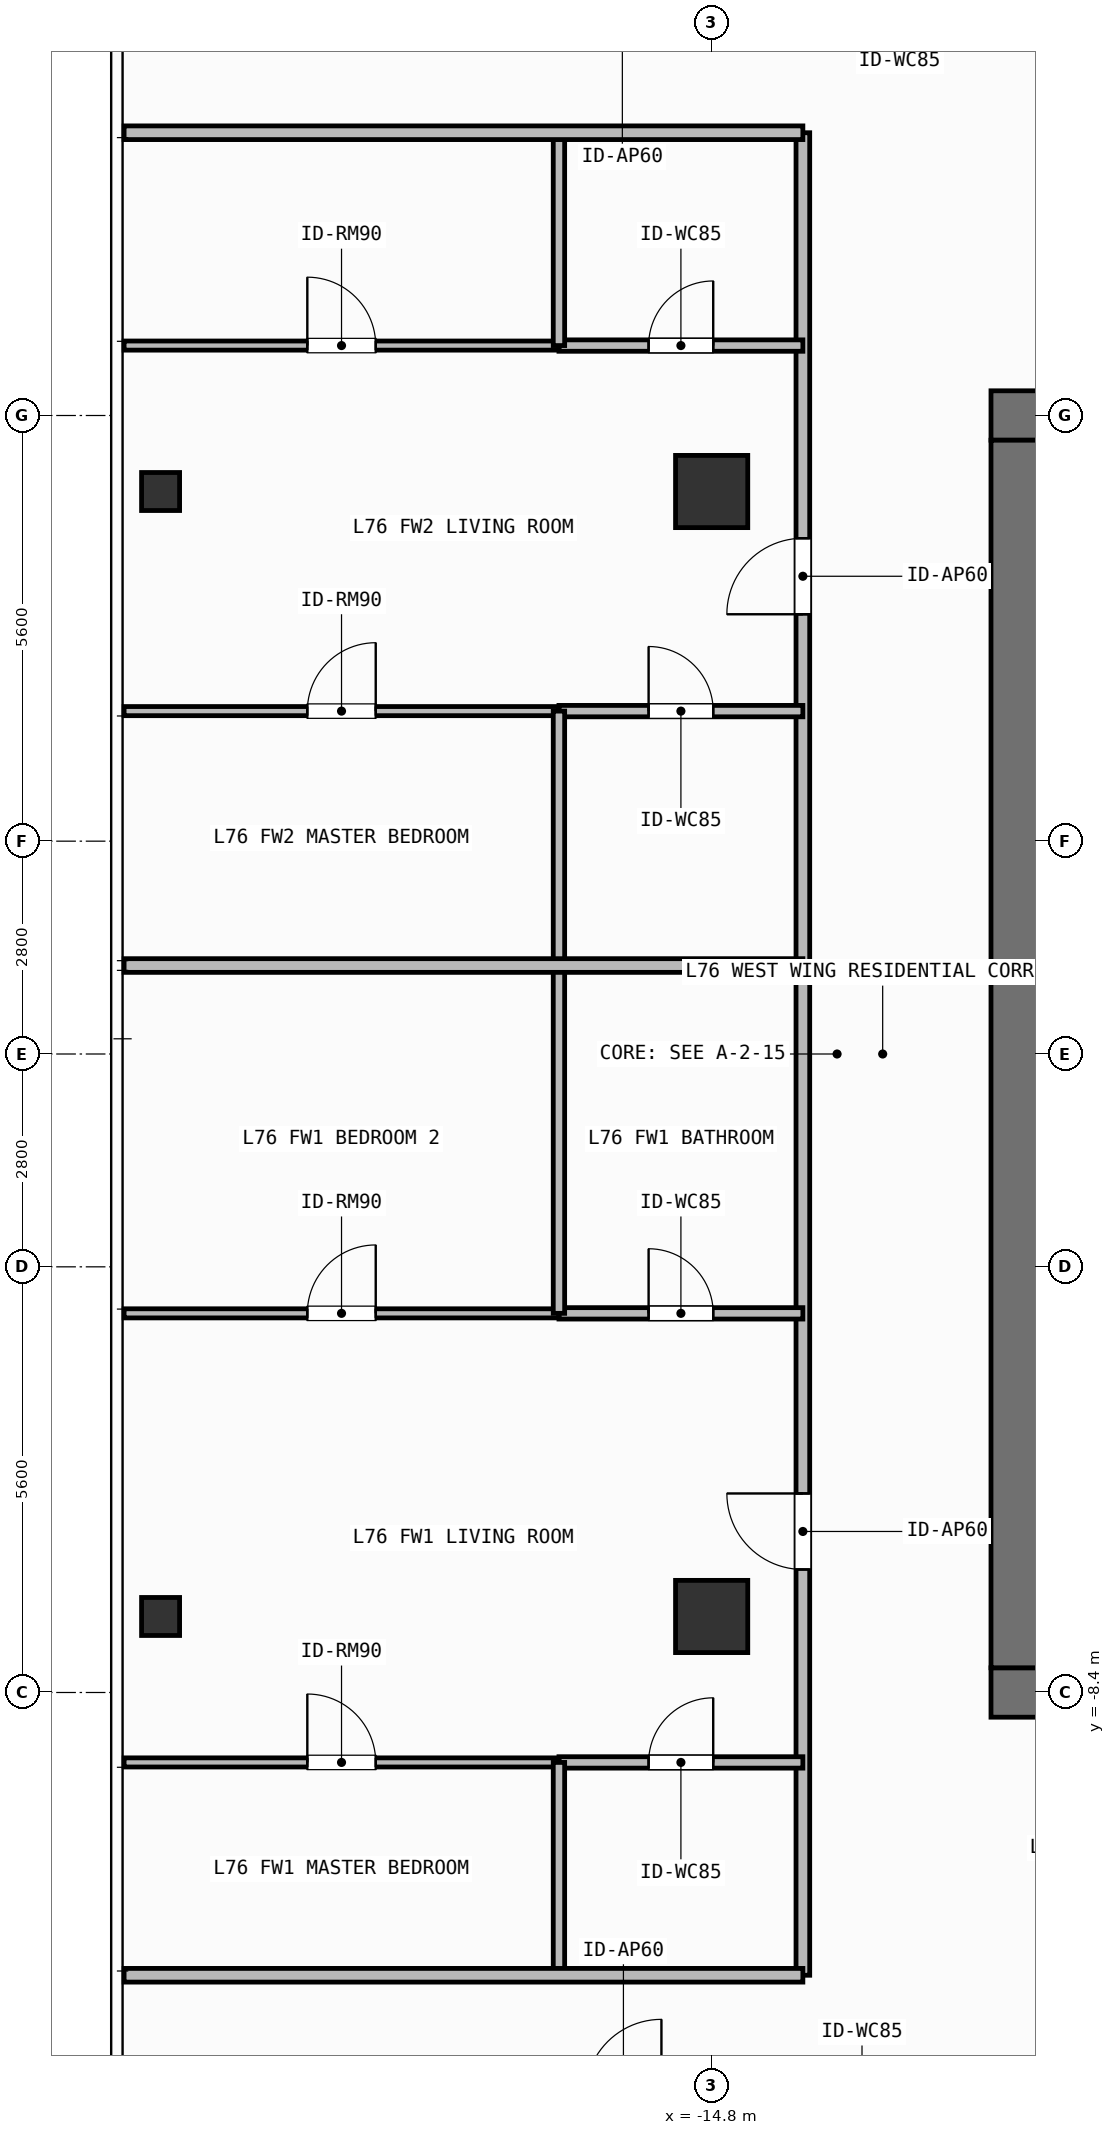
"""IFC4 building model, lengths in metres.
Left out: names, types, materials, properties, quantities, classifications, styles, units other than length and angle.
Written with IfcOpenShell. Run it as: python <this file> out.ifc"""

import sys

from ifc_helpers import new_model, si_unit, direction, frame, frame_2d, origin, origin_2d, place, context, subcontext, project, spatial, rectangle, hollow_rectangle, extrude, element, fill, save


model = new_model("IFC4")
c1 = context("Model", 3, precision=1e-05, world=origin(), true_north=direction((0.0, 1.0)))
c2 = subcontext(c1, "Body", "Model", "MODEL_VIEW")
j1 = project(units=[si_unit("LENGTHUNIT", "METRE"), si_unit("PLANEANGLEUNIT", "RADIAN")], contexts=[c1])
p1 = place(None, origin())
s1 = spatial("IfcSite", under=j1, at=p1, CompositionType="ELEMENT")
p2 = place(p1, origin())
s2 = spatial("IfcBuilding", under=s1, at=p2, CompositionType="ELEMENT")
p3 = place(p2, frame((0.0, 0.0, 309.3)))
s3 = spatial("IfcBuildingStorey", under=s2, at=p3, CompositionType="ELEMENT", Elevation=309.3)
for number, where, z_axis, x_axis in (
    (1, (-11.125, -8.4, 0.0), (0.0, 0.0, 1.0), (1.0, 0.0, 0.0)),
    (2, (-11.125, 8.4, 0.0), (0.0, 0.0, 1.0), (1.0, 0.0, 0.0)),
):
    element("IfcWall", number, at=place(p3, frame(where, z_axis=z_axis, x_axis=x_axis)), inside=s3, PredefinedType="SHEAR", context=c2, shape_type="SweptSolid", body=[
        extrude(rectangle(XDim=1.425, YDim=0.65, at=frame_2d((0.712, 0.0))), origin(), (0.0, 0.0, 1.0), 3.9),
    ])
p4 = place(p3, frame((-10.8, -8.075, 0.0), z_axis=(0.0, 0.0, 1.0), x_axis=(0.0, 1.0, 0.0)))
e3 = element("IfcWall", 3, at=p4, inside=s3, PredefinedType="SHEAR", context=c2, shape_type="SweptSolid", body=[
    extrude(rectangle(XDim=16.15, YDim=0.65, at=frame_2d((8.075, 0.0))), origin(), (0.0, 0.0, 1.0), 3.9),
])
for number, where, z_axis, x_axis in (
    (4, (-14.8, -7.4, 0.0), (0.0, 0.0, 1.0), (1.0, 0.0, 0.0)),
    (5, (-14.8, 7.4, 0.0), (0.0, 0.0, 1.0), (1.0, 0.0, 0.0)),
):
    element("IfcColumn", number, at=place(p3, frame(where, z_axis=z_axis, x_axis=x_axis)), inside=s3, PredefinedType="COLUMN", context=c2, shape_type="SweptSolid", body=[
        extrude(rectangle(XDim=0.95, YDim=0.95, at=origin_2d()), origin(), (0.0, 0.0, 1.0), 3.9),
    ])
for number, where, z_axis, x_axis in (
    (6, (-22.05, -7.4, 0.0), (0.0, 0.0, 1.0), (1.0, 0.0, 0.0)),
    (7, (-22.05, 7.4, 0.0), (0.0, 0.0, 1.0), (1.0, 0.0, 0.0)),
):
    element("IfcColumn", number, at=place(p3, frame(where, z_axis=z_axis, x_axis=x_axis)), inside=s3, PredefinedType="COLUMN", context=c2, shape_type="SweptSolid", body=[
        extrude(hollow_rectangle(XDim=0.5, YDim=0.5, WallThickness=0.025, at=origin_2d()), origin(), (0.0, 0.0, 1.0), 3.9),
    ])
p5 = place(p3, frame((-13.6, -12.12, 0.0), z_axis=(0.0, 0.0, 1.0), x_axis=(0.0, 1.0, 0.0)))
e8 = element("IfcWall", 8, at=p5, inside=s3, PredefinedType="PARTITIONING", context=c2, shape_type="SweptSolid", body=[
    extrude(rectangle(XDim=13.284, YDim=0.18, at=frame_2d((6.642, 0.0))), origin(), (0.0, 0.0, 1.0), 3.64),
])
p6 = place(p5, frame((5.338, 0.0, 0.0)))
e9 = element("IfcOpeningElement", 9, at=p6, cuts=e8, PredefinedType="OPENING", context=c2, shape_type="SweptSolid", body=[
    extrude(rectangle(XDim=1.0, YDim=2.2, at=frame_2d((0.5, 1.1))), frame((0.0, 0.1, 0.0), z_axis=(0.0, -1.0, 0.0), x_axis=(1.0, 0.0, 0.0)), (0.0, 0.0, 1.0), 0.2),
])
p7 = place(p3, frame((-16.809, -3.412, 0.0), z_axis=(0.0, 0.0, 1.0), x_axis=(1.0, 0.0, 0.0)))
e10 = element("IfcWall", 10, at=p7, inside=s3, PredefinedType="PARTITIONING", context=c2, shape_type="SweptSolid", body=[
    extrude(rectangle(XDim=3.209, YDim=0.15, at=frame_2d((1.604, 0.0))), origin(), (0.0, 0.0, 1.0), 3.64),
])
p8 = place(p7, frame((1.179, 0.0, 0.0)))
e11 = element("IfcOpeningElement", 11, at=p8, cuts=e10, PredefinedType="OPENING", context=c2, shape_type="SweptSolid", body=[
    extrude(rectangle(XDim=0.85, YDim=2.1, at=frame_2d((0.425, 1.05))), frame((0.0, 0.085, 0.0), z_axis=(0.0, -1.0, 0.0), x_axis=(1.0, 0.0, 0.0)), (0.0, 0.0, 1.0), 0.17),
])
p9 = place(p3, frame((-16.809, -9.32, 0.0), z_axis=(0.0, 0.0, 1.0), x_axis=(1.0, 0.0, 0.0)))
e12 = element("IfcWall", 12, at=p9, inside=s3, PredefinedType="PARTITIONING", context=c2, shape_type="SweptSolid", body=[
    extrude(rectangle(XDim=3.209, YDim=0.15, at=frame_2d((1.604, 0.0))), origin(), (0.0, 0.0, 1.0), 3.64),
])
p10 = place(p9, frame((1.179, 0.0, 0.0)))
e13 = element("IfcOpeningElement", 13, at=p10, cuts=e12, PredefinedType="OPENING", context=c2, shape_type="SweptSolid", body=[
    extrude(rectangle(XDim=0.85, YDim=2.1, at=frame_2d((0.425, 1.05))), frame((0.0, 0.085, 0.0), z_axis=(0.0, -1.0, 0.0), x_axis=(1.0, 0.0, 0.0)), (0.0, 0.0, 1.0), 0.17),
])
p11 = place(p3, frame((-22.53, -9.32, 0.0), z_axis=(0.0, 0.0, 1.0), x_axis=(1.0, 0.0, 0.0)))
e14 = element("IfcWall", 14, at=p11, inside=s3, PredefinedType="PARTITIONING", context=c2, shape_type="SweptSolid", body=[
    extrude(rectangle(XDim=5.721, YDim=0.12, at=frame_2d((2.86, 0.0))), origin(), (0.0, 0.0, 1.0), 3.64),
])
p12 = place(p11, frame((2.41, 0.0, 0.0)))
e15 = element("IfcOpeningElement", 15, at=p12, cuts=e14, PredefinedType="OPENING", context=c2, shape_type="SweptSolid", body=[
    extrude(rectangle(XDim=0.9, YDim=2.1, at=frame_2d((0.45, 1.05))), frame((0.0, 0.07, 0.0), z_axis=(0.0, -1.0, 0.0), x_axis=(1.0, 0.0, 0.0)), (0.0, 0.0, 1.0), 0.14),
])
p13 = place(p3, frame((-22.53, -3.412, 0.0), z_axis=(0.0, 0.0, 1.0), x_axis=(1.0, 0.0, 0.0)))
e16 = element("IfcWall", 16, at=p13, inside=s3, PredefinedType="PARTITIONING", context=c2, shape_type="SweptSolid", body=[
    extrude(rectangle(XDim=5.721, YDim=0.12, at=frame_2d((2.86, 0.0))), origin(), (0.0, 0.0, 1.0), 3.64),
])
p14 = place(p13, frame((2.41, 0.0, 0.0)))
e17 = element("IfcOpeningElement", 17, at=p14, cuts=e16, PredefinedType="OPENING", context=c2, shape_type="SweptSolid", body=[
    extrude(rectangle(XDim=0.9, YDim=2.1, at=frame_2d((0.45, 1.05))), frame((0.0, 0.07, 0.0), z_axis=(0.0, -1.0, 0.0), x_axis=(1.0, 0.0, 0.0)), (0.0, 0.0, 1.0), 0.14),
])
p15 = place(p3, frame((-13.6, 1.164, 0.0), z_axis=(0.0, 0.0, 1.0), x_axis=(0.0, 1.0, 0.0)))
e18 = element("IfcWall", 18, at=p15, inside=s3, PredefinedType="PARTITIONING", context=c2, shape_type="SweptSolid", body=[
    extrude(rectangle(XDim=10.956, YDim=0.18, at=frame_2d((5.478, 0.0))), origin(), (0.0, 0.0, 1.0), 3.64),
])
p16 = place(p15, frame((4.621, 0.0, 0.0)))
e19 = element("IfcOpeningElement", 19, at=p16, cuts=e18, PredefinedType="OPENING", context=c2, shape_type="SweptSolid", body=[
    extrude(rectangle(XDim=1.0, YDim=2.2, at=frame_2d((0.5, 1.1))), frame((0.0, 0.1, 0.0), z_axis=(0.0, -1.0, 0.0), x_axis=(1.0, 0.0, 0.0)), (0.0, 0.0, 1.0), 0.2),
])
p17 = place(p3, frame((-16.809, 9.32, 0.0), z_axis=(0.0, 0.0, 1.0), x_axis=(1.0, 0.0, 0.0)))
e20 = element("IfcWall", 20, at=p17, inside=s3, PredefinedType="PARTITIONING", context=c2, shape_type="SweptSolid", body=[
    extrude(rectangle(XDim=3.209, YDim=0.15, at=frame_2d((1.604, 0.0))), origin(), (0.0, 0.0, 1.0), 3.64),
])
p18 = place(p17, frame((1.179, 0.0, 0.0)))
e21 = element("IfcOpeningElement", 21, at=p18, cuts=e20, PredefinedType="OPENING", context=c2, shape_type="SweptSolid", body=[
    extrude(rectangle(XDim=0.85, YDim=2.1, at=frame_2d((0.425, 1.05))), frame((0.0, 0.085, 0.0), z_axis=(0.0, -1.0, 0.0), x_axis=(1.0, 0.0, 0.0)), (0.0, 0.0, 1.0), 0.17),
])
p19 = place(p3, frame((-16.809, 4.511, 0.0), z_axis=(0.0, 0.0, 1.0), x_axis=(1.0, 0.0, 0.0)))
e22 = element("IfcWall", 22, at=p19, inside=s3, PredefinedType="PARTITIONING", context=c2, shape_type="SweptSolid", body=[
    extrude(rectangle(XDim=3.209, YDim=0.15, at=frame_2d((1.604, 0.0))), origin(), (0.0, 0.0, 1.0), 3.64),
])
p20 = place(p19, frame((1.179, 0.0, 0.0)))
e23 = element("IfcOpeningElement", 23, at=p20, cuts=e22, PredefinedType="OPENING", context=c2, shape_type="SweptSolid", body=[
    extrude(rectangle(XDim=0.85, YDim=2.1, at=frame_2d((0.425, 1.05))), frame((0.0, 0.085, 0.0), z_axis=(0.0, -1.0, 0.0), x_axis=(1.0, 0.0, 0.0)), (0.0, 0.0, 1.0), 0.17),
])
p21 = place(p3, frame((-22.53, 4.511, 0.0), z_axis=(0.0, 0.0, 1.0), x_axis=(1.0, 0.0, 0.0)))
e24 = element("IfcWall", 24, at=p21, inside=s3, PredefinedType="PARTITIONING", context=c2, shape_type="SweptSolid", body=[
    extrude(rectangle(XDim=5.721, YDim=0.12, at=frame_2d((2.86, 0.0))), origin(), (0.0, 0.0, 1.0), 3.64),
])
p22 = place(p21, frame((2.41, 0.0, 0.0)))
e25 = element("IfcOpeningElement", 25, at=p22, cuts=e24, PredefinedType="OPENING", context=c2, shape_type="SweptSolid", body=[
    extrude(rectangle(XDim=0.9, YDim=2.1, at=frame_2d((0.45, 1.05))), frame((0.0, 0.07, 0.0), z_axis=(0.0, -1.0, 0.0), x_axis=(1.0, 0.0, 0.0)), (0.0, 0.0, 1.0), 0.14),
])
p23 = place(p3, frame((-22.53, 9.32, 0.0), z_axis=(0.0, 0.0, 1.0), x_axis=(1.0, 0.0, 0.0)))
e26 = element("IfcWall", 26, at=p23, inside=s3, PredefinedType="PARTITIONING", context=c2, shape_type="SweptSolid", body=[
    extrude(rectangle(XDim=5.721, YDim=0.12, at=frame_2d((2.86, 0.0))), origin(), (0.0, 0.0, 1.0), 3.64),
])
p24 = place(p23, frame((2.41, 0.0, 0.0)))
e27 = element("IfcOpeningElement", 27, at=p24, cuts=e26, PredefinedType="OPENING", context=c2, shape_type="SweptSolid", body=[
    extrude(rectangle(XDim=0.9, YDim=2.1, at=frame_2d((0.45, 1.05))), frame((0.0, 0.07, 0.0), z_axis=(0.0, -1.0, 0.0), x_axis=(1.0, 0.0, 0.0)), (0.0, 0.0, 1.0), 0.14),
])
p25 = place(p3, frame((-16.809, -12.12, 0.0), z_axis=(0.0, 0.0, 1.0), x_axis=(0.0, 1.0, 0.0)))
e28 = element("IfcWall", 28, at=p25, inside=s3, PredefinedType="PARTITIONING", context=c2, shape_type="SweptSolid", body=[
    extrude(rectangle(XDim=2.8, YDim=0.15, at=frame_2d((1.4, 0.0))), origin(), (0.0, 0.0, 1.0), 3.64),
])
p26 = place(p3, frame((-16.809, -3.412, 0.0), z_axis=(0.0, 0.0, 1.0), x_axis=(0.0, 1.0, 0.0)))
e29 = element("IfcWall", 29, at=p26, inside=s3, PredefinedType="PARTITIONING", context=c2, shape_type="SweptSolid", body=[
    extrude(rectangle(XDim=4.576, YDim=0.15, at=frame_2d((2.288, 0.0))), origin(), (0.0, 0.0, 1.0), 3.64),
])
p27 = place(p3, frame((-16.809, 1.164, 0.0), z_axis=(0.0, 0.0, 1.0), x_axis=(0.0, 1.0, 0.0)))
e30 = element("IfcWall", 30, at=p27, inside=s3, PredefinedType="PARTITIONING", context=c2, shape_type="SweptSolid", body=[
    extrude(rectangle(XDim=3.347, YDim=0.15, at=frame_2d((1.673, 0.0))), origin(), (0.0, 0.0, 1.0), 3.64),
])
p28 = place(p3, frame((-16.809, 9.32, 0.0), z_axis=(0.0, 0.0, 1.0), x_axis=(0.0, 1.0, 0.0)))
e31 = element("IfcWall", 31, at=p28, inside=s3, PredefinedType="PARTITIONING", context=c2, shape_type="SweptSolid", body=[
    extrude(rectangle(XDim=2.8, YDim=0.15, at=frame_2d((1.4, 0.0))), origin(), (0.0, 0.0, 1.0), 3.64),
])
for number, where, z_axis, x_axis in (
    (32, (-22.53, 1.164, 0.0), (0.0, 0.0, 1.0), (1.0, 0.0, 0.0)),
    (33, (-22.53, -12.12, 0.0), (0.0, 0.0, 1.0), (1.0, 0.0, 0.0)),
    (34, (-22.53, 12.12, 0.0), (0.0, 0.0, 1.0), (1.0, 0.0, 0.0)),
):
    element("IfcWall", number, at=place(p3, frame(where, z_axis=z_axis, x_axis=x_axis)), inside=s3, PredefinedType="PARTITIONING", context=c2, shape_type="SweptSolid", body=[
        extrude(rectangle(XDim=8.93, YDim=0.18, at=frame_2d((4.465, 0.0))), origin(), (0.0, 0.0, 1.0), 3.64),
    ])
p29 = place(p6, origin())
e35 = element("IfcDoor", 35, at=p29, inside=s3, OperationType="SINGLE_SWING_RIGHT", PredefinedType="DOOR", context=c2, shape_type="SweptSolid", body=[
    extrude(rectangle(XDim=1.0, YDim=2.2, at=frame_2d((0.5, 1.1))), frame((0.0, 0.025, 0.0), z_axis=(0.0, -1.0, 0.0), x_axis=(1.0, 0.0, 0.0)), (0.0, 0.0, 1.0), 0.05),
])
fill(e9, e35)
p30 = place(p8, origin())
e36 = element("IfcDoor", 36, at=p30, inside=s3, OperationType="SINGLE_SWING_LEFT", PredefinedType="DOOR", context=c2, shape_type="SweptSolid", body=[
    extrude(rectangle(XDim=0.85, YDim=2.1, at=frame_2d((0.425, 1.05))), frame((0.0, 0.025, 0.0), z_axis=(0.0, -1.0, 0.0), x_axis=(1.0, 0.0, 0.0)), (0.0, 0.0, 1.0), 0.05),
])
fill(e11, e36)
p31 = place(p10, origin())
e37 = element("IfcDoor", 37, at=p31, inside=s3, OperationType="SINGLE_SWING_RIGHT", PredefinedType="DOOR", context=c2, shape_type="SweptSolid", body=[
    extrude(rectangle(XDim=0.85, YDim=2.1, at=frame_2d((0.425, 1.05))), frame((0.0, 0.025, 0.0), z_axis=(0.0, -1.0, 0.0), x_axis=(1.0, 0.0, 0.0)), (0.0, 0.0, 1.0), 0.05),
])
fill(e13, e37)
p32 = place(p12, origin())
e38 = element("IfcDoor", 38, at=p32, inside=s3, OperationType="SINGLE_SWING_LEFT", PredefinedType="DOOR", context=c2, shape_type="SweptSolid", body=[
    extrude(rectangle(XDim=0.9, YDim=2.1, at=frame_2d((0.45, 1.05))), frame((0.0, 0.025, 0.0), z_axis=(0.0, -1.0, 0.0), x_axis=(1.0, 0.0, 0.0)), (0.0, 0.0, 1.0), 0.05),
])
fill(e15, e38)
p33 = place(p14, origin())
e39 = element("IfcDoor", 39, at=p33, inside=s3, OperationType="SINGLE_SWING_RIGHT", PredefinedType="DOOR", context=c2, shape_type="SweptSolid", body=[
    extrude(rectangle(XDim=0.9, YDim=2.1, at=frame_2d((0.45, 1.05))), frame((0.0, 0.025, 0.0), z_axis=(0.0, -1.0, 0.0), x_axis=(1.0, 0.0, 0.0)), (0.0, 0.0, 1.0), 0.05),
])
fill(e17, e39)
p34 = place(p16, origin())
e40 = element("IfcDoor", 40, at=p34, inside=s3, OperationType="SINGLE_SWING_LEFT", PredefinedType="DOOR", context=c2, shape_type="SweptSolid", body=[
    extrude(rectangle(XDim=1.0, YDim=2.2, at=frame_2d((0.5, 1.1))), frame((0.0, 0.025, 0.0), z_axis=(0.0, -1.0, 0.0), x_axis=(1.0, 0.0, 0.0)), (0.0, 0.0, 1.0), 0.05),
])
fill(e19, e40)
p35 = place(p18, origin())
e41 = element("IfcDoor", 41, at=p35, inside=s3, OperationType="SINGLE_SWING_RIGHT", PredefinedType="DOOR", context=c2, shape_type="SweptSolid", body=[
    extrude(rectangle(XDim=0.85, YDim=2.1, at=frame_2d((0.425, 1.05))), frame((0.0, 0.025, 0.0), z_axis=(0.0, -1.0, 0.0), x_axis=(1.0, 0.0, 0.0)), (0.0, 0.0, 1.0), 0.05),
])
fill(e21, e41)
p36 = place(p20, origin())
e42 = element("IfcDoor", 42, at=p36, inside=s3, OperationType="SINGLE_SWING_LEFT", PredefinedType="DOOR", context=c2, shape_type="SweptSolid", body=[
    extrude(rectangle(XDim=0.85, YDim=2.1, at=frame_2d((0.425, 1.05))), frame((0.0, 0.025, 0.0), z_axis=(0.0, -1.0, 0.0), x_axis=(1.0, 0.0, 0.0)), (0.0, 0.0, 1.0), 0.05),
])
fill(e23, e42)
p37 = place(p22, origin())
e43 = element("IfcDoor", 43, at=p37, inside=s3, OperationType="SINGLE_SWING_RIGHT", PredefinedType="DOOR", context=c2, shape_type="SweptSolid", body=[
    extrude(rectangle(XDim=0.9, YDim=2.1, at=frame_2d((0.45, 1.05))), frame((0.0, 0.025, 0.0), z_axis=(0.0, -1.0, 0.0), x_axis=(1.0, 0.0, 0.0)), (0.0, 0.0, 1.0), 0.05),
])
fill(e25, e43)
p38 = place(p24, origin())
e44 = element("IfcDoor", 44, at=p38, inside=s3, OperationType="SINGLE_SWING_LEFT", PredefinedType="DOOR", context=c2, shape_type="SweptSolid", body=[
    extrude(rectangle(XDim=0.9, YDim=2.1, at=frame_2d((0.45, 1.05))), frame((0.0, 0.025, 0.0), z_axis=(0.0, -1.0, 0.0), x_axis=(1.0, 0.0, 0.0)), (0.0, 0.0, 1.0), 0.05),
])
fill(e27, e44)
save(model, sys.argv[1])
